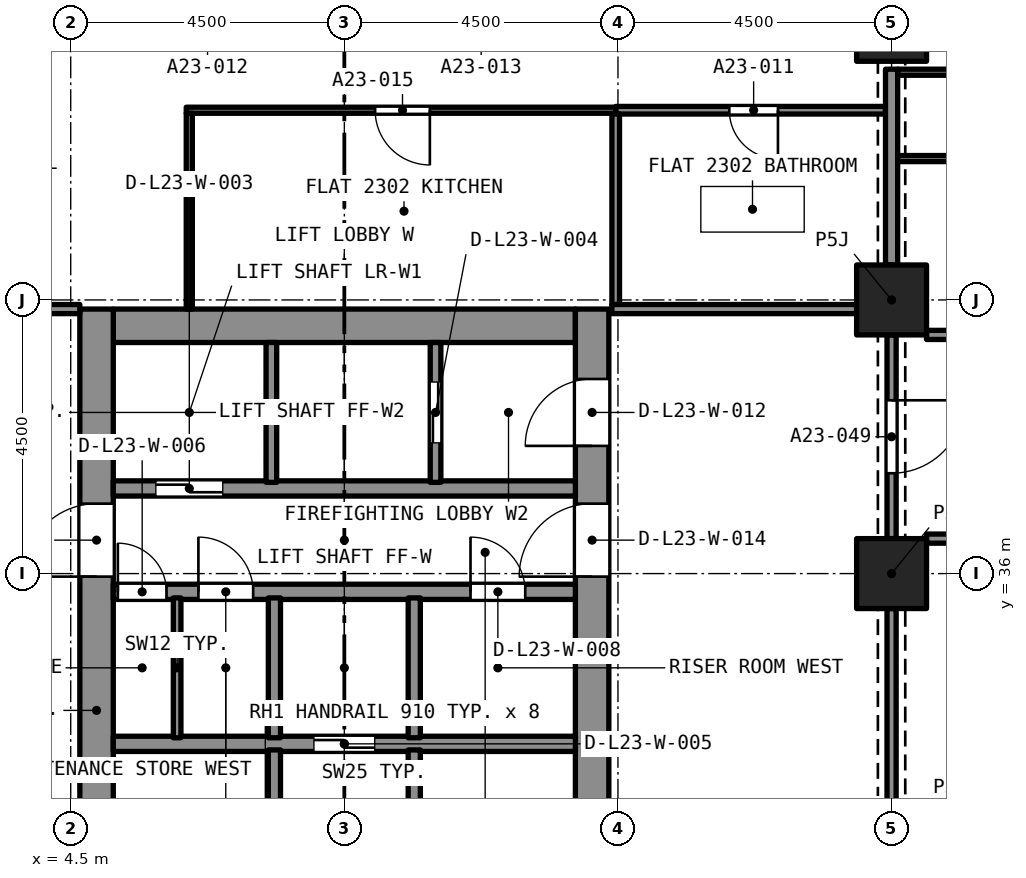
"""IFC4 building model, lengths in metres.
Left out: names, types, materials, properties, quantities, classifications, styles, units other than length and angle.
Written with IfcOpenShell. Run it as: python <this file> out.ifc"""

import sys

from ifc_helpers import new_model, si_unit, direction, frame, frame_2d, origin, origin_2d, place, context, subcontext, project, spatial, rectangle, extrude, element, fill, save


model = new_model("IFC4")
c1 = context("Model", 3, precision=1e-05, world=origin(), true_north=direction((0.0, 1.0)))
c2 = subcontext(c1, "Body", "Model", "MODEL_VIEW")
j1 = project(units=[si_unit("LENGTHUNIT", "METRE"), si_unit("PLANEANGLEUNIT", "RADIAN")], contexts=[c1])
p1 = place(None, origin())
s1 = spatial("IfcSite", under=j1, at=p1, CompositionType="ELEMENT")
p2 = place(p1, origin())
s2 = spatial("IfcBuilding", under=s1, at=p2, CompositionType="ELEMENT")
p3 = place(p2, frame((0.0, 0.0, 86.4)))
s3 = spatial("IfcBuildingStorey", under=s2, at=p3, CompositionType="ELEMENT", Elevation=86.4)
for number, where, z_axis, x_axis in (
    (1, (18.0, 36.0, 0.0), (0.0, 0.0, 1.0), (1.0, 0.0, 0.0)),
    (2, (18.0, 40.5, 0.0), (0.0, 0.0, 1.0), (1.0, 0.0, 0.0)),
    (3, (18.0, 45.0, 0.0), (0.0, 0.0, 1.0), (1.0, 0.0, 0.0)),
):
    element("IfcColumn", number, at=place(p3, frame(where, z_axis=z_axis, x_axis=x_axis)), inside=s3, PredefinedType="COLUMN", context=c2, shape_type="SweptSolid", body=[
        extrude(rectangle(XDim=1.15, YDim=1.15, at=origin_2d()), origin(), (0.0, 0.0, 1.0), 3.2),
    ])
p4 = place(p3, frame((5.2, 40.075, 0.0), z_axis=(0.0, 0.0, 1.0), x_axis=(1.0, 0.0, 0.0)))
e4 = element("IfcWall", 4, at=p4, inside=s3, PredefinedType="SOLIDWALL", context=c2, shape_type="SweptSolid", body=[
    extrude(rectangle(XDim=7.6, YDim=0.55, at=frame_2d((3.8, 0.0))), origin(), (0.0, 0.0, 1.0), 3.2),
])
p5 = place(p3, frame((4.925, 27.15, 0.0), z_axis=(0.0, 0.0, 1.0), x_axis=(0.0, 1.0, 0.0)))
e5 = element("IfcWall", 5, at=p5, inside=s3, PredefinedType="SOLIDWALL", context=c2, shape_type="SweptSolid", body=[
    extrude(rectangle(XDim=13.2, YDim=0.55, at=frame_2d((6.6, 0.0))), origin(), (0.0, 0.0, 1.0), 3.2),
])
p6 = place(p5, frame((8.8, 0.0, 0.0)))
e6 = element("IfcOpeningElement", 6, at=p6, cuts=e5, PredefinedType="OPENING", context=c2, shape_type="SweptSolid", body=[
    extrude(rectangle(XDim=1.2, YDim=2.1, at=frame_2d((0.6, 1.05))), frame((0.0, 0.285, 0.0), z_axis=(0.0, -1.0, 0.0), x_axis=(1.0, 0.0, 0.0)), (0.0, 0.0, 1.0), 0.57),
])
p7 = place(p3, frame((13.075, 27.15, 0.0), z_axis=(0.0, 0.0, 1.0), x_axis=(0.0, 1.0, 0.0)))
e7 = element("IfcWall", 7, at=p7, inside=s3, PredefinedType="SOLIDWALL", context=c2, shape_type="SweptSolid", body=[
    extrude(rectangle(XDim=13.2, YDim=0.55, at=frame_2d((6.6, 0.0))), origin(), (0.0, 0.0, 1.0), 3.2),
])
p8 = place(p7, frame((10.95, 0.0, 0.0)))
e8 = element("IfcOpeningElement", 8, at=p8, cuts=e7, PredefinedType="OPENING", context=c2, shape_type="SweptSolid", body=[
    extrude(rectangle(XDim=1.1, YDim=2.1, at=frame_2d((0.55, 1.05))), frame((0.0, 0.285, 0.0), z_axis=(0.0, -1.0, 0.0), x_axis=(1.0, 0.0, 0.0)), (0.0, 0.0, 1.0), 0.57),
])
p9 = place(p7, frame((8.8, 0.0, 0.0)))
e9 = element("IfcOpeningElement", 9, at=p9, cuts=e7, PredefinedType="OPENING", context=c2, shape_type="SweptSolid", body=[
    extrude(rectangle(XDim=1.2, YDim=2.1, at=frame_2d((0.6, 1.05))), frame((0.0, 0.285, 0.0), z_axis=(0.0, -1.0, 0.0), x_axis=(1.0, 0.0, 0.0)), (0.0, 0.0, 1.0), 0.57),
])
p10 = place(p3, frame((17.9, 43.62, 0.0), z_axis=(0.0, 0.0, 1.0), x_axis=(-1.0, 0.0, 0.0)))
e10 = element("IfcWall", 10, at=p10, inside=s3, PredefinedType="PARTITIONING", context=c2, shape_type="SweptSolid", body=[
    extrude(rectangle(XDim=4.437, YDim=0.125, at=frame_2d((2.219, 0.0))), origin(), (0.0, 0.0, 1.0), 2.9),
])
p11 = place(p10, frame((1.769, 0.0, 0.0)))
e11 = element("IfcOpeningElement", 11, at=p11, cuts=e10, PredefinedType="OPENING", context=c2, shape_type="SweptSolid", body=[
    extrude(rectangle(XDim=0.8, YDim=2.1, at=frame_2d((0.4, 1.05))), frame((0.0, 0.073, 0.0), z_axis=(0.0, -1.0, 0.0), x_axis=(1.0, 0.0, 0.0)), (0.0, 0.0, 1.0), 0.145),
])
p12 = place(p3, frame((13.463, 40.425, 0.0), z_axis=(0.0, 0.0, 1.0), x_axis=(0.0, 1.0, 0.0)))
e12 = element("IfcWall", 12, at=p12, inside=s3, PredefinedType="PARTITIONING", context=c2, shape_type="SweptSolid", body=[
    extrude(rectangle(XDim=3.133, YDim=0.125, at=frame_2d((1.566, 0.0))), origin(), (0.0, 0.0, 1.0), 2.9),
])
p13 = place(p3, frame((18.0, 41.075, 0.0), z_axis=(0.0, 0.0, 1.0), x_axis=(0.0, 1.0, 0.0)))
e13 = element("IfcWall", 13, at=p13, inside=s3, PredefinedType="PARTITIONING", context=c2, shape_type="SweptSolid", body=[
    extrude(rectangle(XDim=3.22, YDim=0.2, at=frame_2d((1.61, 0.0))), origin(), (0.0, 0.0, 1.0), 2.38),
])
p14 = place(p3, frame((13.4, 40.35, 0.0), z_axis=(0.0, 0.0, 1.0), x_axis=(1.0, 0.0, 0.0)))
e14 = element("IfcWall", 14, at=p14, inside=s3, PredefinedType="PARTITIONING", context=c2, shape_type="SweptSolid", body=[
    extrude(rectangle(XDim=4.025, YDim=0.15, at=frame_2d((2.012, 0.0))), origin(), (0.0, 0.0, 1.0), 2.9),
])
p15 = place(p3, frame((13.463, 43.62, 0.0), z_axis=(0.0, 0.0, 1.0), x_axis=(-1.0, 0.0, 0.0)))
e15 = element("IfcWall", 15, at=p15, inside=s3, PredefinedType="PARTITIONING", context=c2, shape_type="SweptSolid", body=[
    extrude(rectangle(XDim=7.063, YDim=0.1, at=frame_2d((3.531, 0.0))), origin(), (0.0, 0.0, 1.0), 2.9),
])
p16 = place(p15, frame((3.056, 0.0, 0.0)))
e16 = element("IfcOpeningElement", 16, at=p16, cuts=e15, PredefinedType="OPENING", context=c2, shape_type="SweptSolid", body=[
    extrude(rectangle(XDim=0.9, YDim=2.1, at=frame_2d((0.45, 1.05))), frame((0.0, 0.06, 0.0), z_axis=(0.0, -1.0, 0.0), x_axis=(1.0, 0.0, 0.0)), (0.0, 0.0, 1.0), 0.12),
])
p17 = place(p3, frame((6.45, 40.35, 0.0), z_axis=(0.0, 0.0, 1.0), x_axis=(0.0, 1.0, 0.0)))
e17 = element("IfcWall", 17, at=p17, inside=s3, PredefinedType="PARTITIONING", context=c2, shape_type="SweptSolid", body=[
    extrude(rectangle(XDim=3.22, YDim=0.1, at=frame_2d((1.61, 0.0))), origin(), (0.0, 0.0, 1.0), 2.9),
])
p18 = place(p3, frame((0.575, 40.35, 0.0), z_axis=(0.0, 0.0, 1.0), x_axis=(1.0, 0.0, 0.0)))
e18 = element("IfcWall", 18, at=p18, inside=s3, PredefinedType="PARTITIONING", context=c2, shape_type="SweptSolid", body=[
    extrude(rectangle(XDim=4.075, YDim=0.15, at=frame_2d((2.038, 0.0))), origin(), (0.0, 0.0, 1.0), 2.9),
])
p19 = place(p18, frame((1.175, 0.0, 0.0)))
e19 = element("IfcOpeningElement", 19, at=p19, cuts=e18, PredefinedType="OPENING", context=c2, shape_type="SweptSolid", body=[
    extrude(rectangle(XDim=1.0, YDim=2.1, at=frame_2d((0.5, 1.05))), frame((0.0, 0.085, 0.0), z_axis=(0.0, -1.0, 0.0), x_axis=(1.0, 0.0, 0.0)), (0.0, 0.0, 1.0), 0.17),
])
p20 = place(p3, frame((24.2, 42.825, 0.0), z_axis=(0.0, 0.0, 1.0), x_axis=(-1.0, 0.0, 0.0)))
e20 = element("IfcWall", 20, at=p20, inside=s3, PredefinedType="PARTITIONING", context=c2, shape_type="SweptSolid", body=[
    extrude(rectangle(XDim=6.1, YDim=0.1, at=frame_2d((3.05, 0.0))), origin(), (0.0, 0.0, 1.0), 2.75),
])
p21 = place(p20, frame((2.675, 0.0, 0.0)))
e21 = element("IfcOpeningElement", 21, at=p21, cuts=e20, PredefinedType="OPENING", context=c2, shape_type="SweptSolid", body=[
    extrude(rectangle(XDim=0.9, YDim=2.1, at=frame_2d((0.45, 1.05))), frame((0.0, 0.06, 0.0), z_axis=(0.0, -1.0, 0.0), x_axis=(1.0, 0.0, 0.0)), (0.0, 0.0, 1.0), 0.12),
])
p22 = place(p3, frame((18.1, 44.245, 0.0), z_axis=(0.0, 0.0, 1.0), x_axis=(1.0, 0.0, 0.0)))
e22 = element("IfcWall", 22, at=p22, inside=s3, PredefinedType="PARTITIONING", context=c2, shape_type="SweptSolid", body=[
    extrude(rectangle(XDim=4.4, YDim=0.1, at=frame_2d((2.2, 0.0))), origin(), (0.0, 0.0, 1.0), 2.75),
])
p23 = place(p22, frame((1.65, 0.0, 0.0)))
e23 = element("IfcOpeningElement", 23, at=p23, cuts=e22, PredefinedType="OPENING", context=c2, shape_type="SweptSolid", body=[
    extrude(rectangle(XDim=1.0, YDim=2.1, at=frame_2d((0.5, 1.05))), frame((0.0, 0.06, 0.0), z_axis=(0.0, -1.0, 0.0), x_axis=(1.0, 0.0, 0.0)), (0.0, 0.0, 1.0), 0.12),
])
p24 = place(p3, frame((18.575, 39.925, 0.0), z_axis=(0.0, 0.0, 1.0), x_axis=(1.0, 0.0, 0.0)))
e24 = element("IfcWall", 24, at=p24, inside=s3, PredefinedType="PARTITIONING", context=c2, shape_type="SweptSolid", body=[
    extrude(rectangle(XDim=5.575, YDim=0.15, at=frame_2d((2.788, 0.0))), origin(), (0.0, 0.0, 1.0), 2.75),
])
p25 = place(p3, frame((24.75, 36.575, 0.0), z_axis=(0.0, 0.0, 1.0), x_axis=(-1.0, 0.0, 0.0)))
e25 = element("IfcWall", 25, at=p25, inside=s3, PredefinedType="PARTITIONING", context=c2, shape_type="SweptSolid", body=[
    extrude(rectangle(XDim=6.175, YDim=0.15, at=frame_2d((3.087, 0.0))), origin(), (0.0, 0.0, 1.0), 2.75),
])
p26 = place(p25, frame((2.875, 0.0, 0.0)))
e26 = element("IfcOpeningElement", 26, at=p26, cuts=e25, PredefinedType="OPENING", context=c2, shape_type="SweptSolid", body=[
    extrude(rectangle(XDim=1.0, YDim=2.1, at=frame_2d((0.5, 1.05))), frame((0.0, 0.085, 0.0), z_axis=(0.0, -1.0, 0.0), x_axis=(1.0, 0.0, 0.0)), (0.0, 0.0, 1.0), 0.17),
])
p27 = place(p3, frame((18.0, 39.925, 0.0), z_axis=(0.0, 0.0, 1.0), x_axis=(0.0, -1.0, 0.0)))
e27 = element("IfcWall", 27, at=p27, inside=s3, PredefinedType="PARTITIONING", context=c2, shape_type="SweptSolid", body=[
    extrude(rectangle(XDim=3.35, YDim=0.15, at=frame_2d((1.675, 0.0))), origin(), (0.0, 0.0, 1.0), 2.38),
])
p28 = place(p27, frame((1.075, 0.0, 0.0)))
e28 = element("IfcOpeningElement", 28, at=p28, cuts=e27, PredefinedType="OPENING", context=c2, shape_type="SweptSolid", body=[
    extrude(rectangle(XDim=1.2, YDim=2.1, at=frame_2d((0.6, 1.05))), frame((0.0, 0.085, 0.0), z_axis=(0.0, -1.0, 0.0), x_axis=(1.0, 0.0, 0.0)), (0.0, 0.0, 1.0), 0.17),
])
p29 = place(p3, frame((18.0, 32.075, 0.0), z_axis=(0.0, 0.0, 1.0), x_axis=(0.0, 1.0, 0.0)))
e29 = element("IfcWall", 29, at=p29, inside=s3, PredefinedType="PARTITIONING", context=c2, shape_type="SweptSolid", body=[
    extrude(rectangle(XDim=3.35, YDim=0.15, at=frame_2d((1.675, 0.0))), origin(), (0.0, 0.0, 1.0), 2.38),
])
p30 = place(p3, frame((5.2, 33.2, 0.0), z_axis=(0.0, 0.0, 1.0), x_axis=(1.0, 0.0, 0.0)))
e30 = element("IfcWall", 30, at=p30, inside=s3, PredefinedType="SOLIDWALL", context=c2, shape_type="SweptSolid", body=[
    extrude(rectangle(XDim=7.6, YDim=0.25, at=frame_2d((3.8, 0.0))), origin(), (0.0, 0.0, 1.0), 2.9),
])
p31 = place(p30, frame((3.3, 0.0, 0.0)))
e31 = element("IfcOpeningElement", 31, at=p31, cuts=e30, PredefinedType="OPENING", context=c2, shape_type="SweptSolid", body=[
    extrude(rectangle(XDim=1.0, YDim=2.1, at=frame_2d((0.5, 1.05))), frame((0.0, 0.135, 0.0), z_axis=(0.0, -1.0, 0.0), x_axis=(1.0, 0.0, 0.0)), (0.0, 0.0, 1.0), 0.27),
])
p32 = place(p3, frame((5.2, 35.7, 0.0), z_axis=(0.0, 0.0, 1.0), x_axis=(1.0, 0.0, 0.0)))
e32 = element("IfcWall", 32, at=p32, inside=s3, PredefinedType="SOLIDWALL", context=c2, shape_type="SweptSolid", body=[
    extrude(rectangle(XDim=7.6, YDim=0.25, at=frame_2d((3.8, 0.0))), origin(), (0.0, 0.0, 1.0), 2.9),
])
p33 = place(p32, frame((0.075, 0.0, 0.0)))
e33 = element("IfcOpeningElement", 33, at=p33, cuts=e32, PredefinedType="OPENING", context=c2, shape_type="SweptSolid", body=[
    extrude(rectangle(XDim=0.8, YDim=2.1, at=frame_2d((0.4, 1.05))), frame((0.0, 0.135, 0.0), z_axis=(0.0, -1.0, 0.0), x_axis=(1.0, 0.0, 0.0)), (0.0, 0.0, 1.0), 0.27),
])
p34 = place(p32, frame((1.4, 0.0, 0.0)))
e34 = element("IfcOpeningElement", 34, at=p34, cuts=e32, PredefinedType="OPENING", context=c2, shape_type="SweptSolid", body=[
    extrude(rectangle(XDim=0.9, YDim=2.1, at=frame_2d((0.45, 1.05))), frame((0.0, 0.135, 0.0), z_axis=(0.0, -1.0, 0.0), x_axis=(1.0, 0.0, 0.0)), (0.0, 0.0, 1.0), 0.27),
])
p35 = place(p32, frame((5.875, 0.0, 0.0)))
e35 = element("IfcOpeningElement", 35, at=p35, cuts=e32, PredefinedType="OPENING", context=c2, shape_type="SweptSolid", body=[
    extrude(rectangle(XDim=0.9, YDim=2.1, at=frame_2d((0.45, 1.05))), frame((0.0, 0.135, 0.0), z_axis=(0.0, -1.0, 0.0), x_axis=(1.0, 0.0, 0.0)), (0.0, 0.0, 1.0), 0.27),
])
p36 = place(p3, frame((5.2, 37.4, 0.0), z_axis=(0.0, 0.0, 1.0), x_axis=(1.0, 0.0, 0.0)))
e36 = element("IfcWall", 36, at=p36, inside=s3, PredefinedType="SOLIDWALL", context=c2, shape_type="SweptSolid", body=[
    extrude(rectangle(XDim=7.6, YDim=0.25, at=frame_2d((3.8, 0.0))), origin(), (0.0, 0.0, 1.0), 2.9),
])
p37 = place(p36, frame((0.7, 0.0, 0.0)))
e37 = element("IfcOpeningElement", 37, at=p37, cuts=e36, PredefinedType="OPENING", context=c2, shape_type="SweptSolid", body=[
    extrude(rectangle(XDim=1.1, YDim=2.4, at=frame_2d((0.55, 1.2))), frame((0.0, 0.135, 0.0), z_axis=(0.0, -1.0, 0.0), x_axis=(1.0, 0.0, 0.0)), (0.0, 0.0, 1.0), 0.27),
])
p38 = place(p3, frame((7.85, 27.7, 0.0), z_axis=(0.0, 0.0, 1.0), x_axis=(0.0, 1.0, 0.0)))
e38 = element("IfcWall", 38, at=p38, inside=s3, PredefinedType="SOLIDWALL", context=c2, shape_type="SweptSolid", body=[
    extrude(rectangle(XDim=5.4, YDim=0.2, at=frame_2d((2.7, 0.0))), origin(), (0.0, 0.0, 1.0), 2.9),
])
p39 = place(p38, frame((0.2, 0.0, 0.0)))
e39 = element("IfcOpeningElement", 39, at=p39, cuts=e38, PredefinedType="OPENING", context=c2, shape_type="SweptSolid", body=[
    extrude(rectangle(XDim=0.9, YDim=2.1, at=frame_2d((0.45, 1.05))), frame((0.0, 0.11, 0.0), z_axis=(0.0, -1.0, 0.0), x_axis=(1.0, 0.0, 0.0)), (0.0, 0.0, 1.0), 0.22),
])
p40 = place(p3, frame((10.15, 27.7, 0.0), z_axis=(0.0, 0.0, 1.0), x_axis=(0.0, 1.0, 0.0)))
e40 = element("IfcWall", 40, at=p40, inside=s3, PredefinedType="SOLIDWALL", context=c2, shape_type="SweptSolid", body=[
    extrude(rectangle(XDim=5.4, YDim=0.2, at=frame_2d((2.7, 0.0))), origin(), (0.0, 0.0, 1.0), 2.9),
])
p41 = place(p40, frame((0.2, 0.0, 0.0)))
e41 = element("IfcOpeningElement", 41, at=p41, cuts=e40, PredefinedType="OPENING", context=c2, shape_type="SweptSolid", body=[
    extrude(rectangle(XDim=0.9, YDim=2.1, at=frame_2d((0.45, 1.05))), frame((0.0, 0.11, 0.0), z_axis=(0.0, -1.0, 0.0), x_axis=(1.0, 0.0, 0.0)), (0.0, 0.0, 1.0), 0.22),
])
for number, where, z_axis, x_axis in (
    (42, (7.85, 33.3, 0.0), (0.0, 0.0, 1.0), (0.0, 1.0, 0.0)),
    (43, (10.15, 33.3, 0.0), (0.0, 0.0, 1.0), (0.0, 1.0, 0.0)),
):
    element("IfcWall", number, at=place(p3, frame(where, z_axis=z_axis, x_axis=x_axis)), inside=s3, PredefinedType="SOLIDWALL", context=c2, shape_type="SweptSolid", body=[
        extrude(rectangle(XDim=2.3, YDim=0.2, at=frame_2d((1.15, 0.0))), origin(), (0.0, 0.0, 1.0), 2.9),
    ])
p42 = place(p3, frame((7.8, 37.5, 0.0), z_axis=(0.0, 0.0, 1.0), x_axis=(0.0, 1.0, 0.0)))
e44 = element("IfcWall", 44, at=p42, inside=s3, PredefinedType="SOLIDWALL", context=c2, shape_type="SweptSolid", body=[
    extrude(rectangle(XDim=2.3, YDim=0.175, at=frame_2d((1.15, 0.0))), origin(), (0.0, 0.0, 1.0), 2.9),
])
p43 = place(p3, frame((10.5, 37.5, 0.0), z_axis=(0.0, 0.0, 1.0), x_axis=(0.0, 1.0, 0.0)))
e45 = element("IfcWall", 45, at=p43, inside=s3, PredefinedType="SOLIDWALL", context=c2, shape_type="SweptSolid", body=[
    extrude(rectangle(XDim=2.3, YDim=0.175, at=frame_2d((1.15, 0.0))), origin(), (0.0, 0.0, 1.0), 2.9),
])
p44 = place(p43, frame((0.65, 0.0, 0.0)))
e46 = element("IfcOpeningElement", 46, at=p44, cuts=e45, PredefinedType="OPENING", context=c2, shape_type="SweptSolid", body=[
    extrude(rectangle(XDim=1.0, YDim=2.1, at=frame_2d((0.5, 1.05))), frame((0.0, 0.097, 0.0), z_axis=(0.0, -1.0, 0.0), x_axis=(1.0, 0.0, 0.0)), (0.0, 0.0, 1.0), 0.195),
])
p45 = place(p3, frame((6.25, 33.3, 0.0), z_axis=(0.0, 0.0, 1.0), x_axis=(0.0, 1.0, 0.0)))
e47 = element("IfcWall", 47, at=p45, inside=s3, PredefinedType="PARTITIONING", context=c2, shape_type="SweptSolid", body=[
    extrude(rectangle(XDim=2.3, YDim=0.125, at=frame_2d((1.15, 0.0))), origin(), (0.0, 0.0, 1.0), 2.9),
])
p46 = place(p11, origin())
e48 = element("IfcDoor", 48, at=p46, inside=s3, OperationType="SINGLE_SWING_LEFT", PredefinedType="DOOR", context=c2, shape_type="SweptSolid", body=[
    extrude(rectangle(XDim=0.8, YDim=2.1, at=frame_2d((0.4, 1.05))), frame((0.0, 0.025, 0.0), z_axis=(0.0, -1.0, 0.0), x_axis=(1.0, 0.0, 0.0)), (0.0, 0.0, 1.0), 0.05),
])
fill(e11, e48)
p47 = place(p16, origin())
e49 = element("IfcDoor", 49, at=p47, inside=s3, OperationType="SINGLE_SWING_LEFT", PredefinedType="DOOR", context=c2, shape_type="SweptSolid", body=[
    extrude(rectangle(XDim=0.9, YDim=2.1, at=frame_2d((0.45, 1.05))), frame((0.0, 0.025, 0.0), z_axis=(0.0, -1.0, 0.0), x_axis=(1.0, 0.0, 0.0)), (0.0, 0.0, 1.0), 0.05),
])
fill(e16, e49)
p48 = place(p28, origin())
e50 = element("IfcDoor", 50, at=p48, inside=s3, OperationType="SINGLE_SWING_LEFT", PredefinedType="DOOR", context=c2, shape_type="SweptSolid", body=[
    extrude(rectangle(XDim=1.2, YDim=2.1, at=frame_2d((0.6, 1.05))), frame((0.0, 0.025, 0.0), z_axis=(0.0, -1.0, 0.0), x_axis=(1.0, 0.0, 0.0)), (0.0, 0.0, 1.0), 0.05),
])
fill(e28, e50)
p49 = place(p37, origin())
e51 = element("IfcDoor", 51, at=p49, inside=s3, OperationType="SLIDING_TO_LEFT", PredefinedType="DOOR", context=c2, shape_type="SweptSolid", body=[
    extrude(rectangle(XDim=1.1, YDim=2.4, at=frame_2d((0.55, 1.2))), frame((0.0, 0.025, 0.0), z_axis=(0.0, -1.0, 0.0), x_axis=(1.0, 0.0, 0.0)), (0.0, 0.0, 1.0), 0.05),
])
fill(e37, e51)
p50 = place(p44, origin())
e52 = element("IfcDoor", 52, at=p50, inside=s3, OperationType="SLIDING_TO_LEFT", PredefinedType="DOOR", context=c2, shape_type="SweptSolid", body=[
    extrude(rectangle(XDim=1.0, YDim=2.1, at=frame_2d((0.5, 1.05))), frame((0.0, 0.025, 0.0), z_axis=(0.0, -1.0, 0.0), x_axis=(1.0, 0.0, 0.0)), (0.0, 0.0, 1.0), 0.05),
])
fill(e46, e52)
p51 = place(p31, origin())
e53 = element("IfcDoor", 53, at=p51, inside=s3, OperationType="SLIDING_TO_LEFT", PredefinedType="DOOR", context=c2, shape_type="SweptSolid", body=[
    extrude(rectangle(XDim=1.0, YDim=2.1, at=frame_2d((0.5, 1.05))), frame((0.0, 0.025, 0.0), z_axis=(0.0, -1.0, 0.0), x_axis=(1.0, 0.0, 0.0)), (0.0, 0.0, 1.0), 0.05),
])
fill(e31, e53)
p52 = place(p33, origin())
e54 = element("IfcDoor", 54, at=p52, inside=s3, OperationType="SINGLE_SWING_LEFT", PredefinedType="DOOR", context=c2, shape_type="SweptSolid", body=[
    extrude(rectangle(XDim=0.8, YDim=2.1, at=frame_2d((0.4, 1.05))), frame((0.0, 0.025, 0.0), z_axis=(0.0, -1.0, 0.0), x_axis=(1.0, 0.0, 0.0)), (0.0, 0.0, 1.0), 0.05),
])
fill(e33, e54)
p53 = place(p34, origin())
e55 = element("IfcDoor", 55, at=p53, inside=s3, OperationType="SINGLE_SWING_LEFT", PredefinedType="DOOR", context=c2, shape_type="SweptSolid", body=[
    extrude(rectangle(XDim=0.9, YDim=2.1, at=frame_2d((0.45, 1.05))), frame((0.0, 0.025, 0.0), z_axis=(0.0, -1.0, 0.0), x_axis=(1.0, 0.0, 0.0)), (0.0, 0.0, 1.0), 0.05),
])
fill(e34, e55)
p54 = place(p35, origin())
e56 = element("IfcDoor", 56, at=p54, inside=s3, OperationType="SINGLE_SWING_LEFT", PredefinedType="DOOR", context=c2, shape_type="SweptSolid", body=[
    extrude(rectangle(XDim=0.9, YDim=2.1, at=frame_2d((0.45, 1.05))), frame((0.0, 0.025, 0.0), z_axis=(0.0, -1.0, 0.0), x_axis=(1.0, 0.0, 0.0)), (0.0, 0.0, 1.0), 0.05),
])
fill(e35, e56)
p55 = place(p8, origin())
e57 = element("IfcDoor", 57, at=p55, inside=s3, OperationType="SINGLE_SWING_LEFT", PredefinedType="DOOR", context=c2, shape_type="SweptSolid", body=[
    extrude(rectangle(XDim=1.1, YDim=2.1, at=frame_2d((0.55, 1.05))), frame((0.0, 0.025, 0.0), z_axis=(0.0, -1.0, 0.0), x_axis=(1.0, 0.0, 0.0)), (0.0, 0.0, 1.0), 0.05),
])
fill(e8, e57)
p56 = place(p6, origin())
e58 = element("IfcDoor", 58, at=p56, inside=s3, OperationType="SINGLE_SWING_LEFT", PredefinedType="DOOR", context=c2, shape_type="SweptSolid", body=[
    extrude(rectangle(XDim=1.2, YDim=2.1, at=frame_2d((0.6, 1.05))), frame((0.0, 0.025, 0.0), z_axis=(0.0, -1.0, 0.0), x_axis=(1.0, 0.0, 0.0)), (0.0, 0.0, 1.0), 0.05),
])
fill(e6, e58)
p57 = place(p9, origin())
e59 = element("IfcDoor", 59, at=p57, inside=s3, OperationType="SINGLE_SWING_LEFT", PredefinedType="DOOR", context=c2, shape_type="SweptSolid", body=[
    extrude(rectangle(XDim=1.2, YDim=2.1, at=frame_2d((0.6, 1.05))), frame((0.0, 0.025, 0.0), z_axis=(0.0, -1.0, 0.0), x_axis=(1.0, 0.0, 0.0)), (0.0, 0.0, 1.0), 0.05),
])
fill(e9, e59)
save(model, sys.argv[1])
